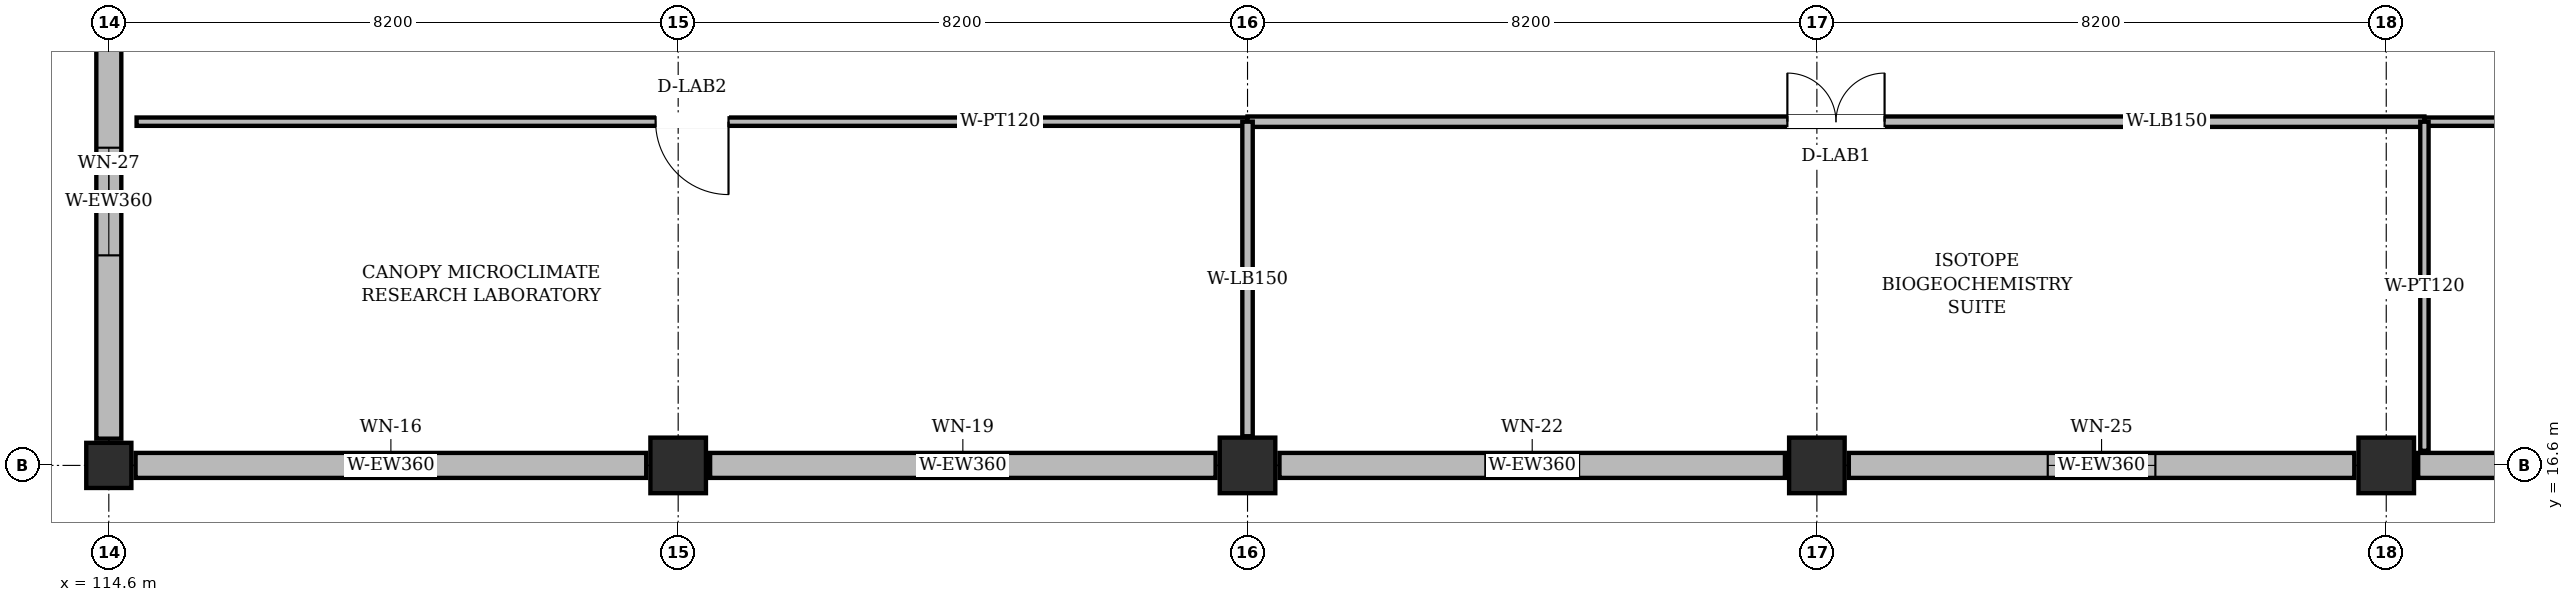
"""IFC4 building model, lengths in metres.
Left out: names, types, materials, properties, quantities, classifications, styles, units other than length and angle.
Written with IfcOpenShell. Run it as: python <this file> out.ifc"""

import sys

from ifc_helpers import new_model, si_unit, direction, frame, frame_2d, origin, origin_2d, place, context, subcontext, project, spatial, rectangle, extrude, element, fill, save


model = new_model("IFC4")
c1 = context("Model", 3, precision=1e-05, world=origin(), true_north=direction((0.0, 1.0)))
c2 = subcontext(c1, "Body", "Model", "MODEL_VIEW")
j1 = project(units=[si_unit("LENGTHUNIT", "METRE"), si_unit("PLANEANGLEUNIT", "RADIAN")], contexts=[c1])
p1 = place(None, origin())
s1 = spatial("IfcSite", under=j1, at=p1, CompositionType="ELEMENT")
p2 = place(p1, origin())
s2 = spatial("IfcBuilding", under=s1, at=p2, CompositionType="ELEMENT")
p3 = place(p2, frame((0.0, 0.0, 32.4)))
s3 = spatial("IfcBuildingStorey", under=s2, at=p3, CompositionType="ELEMENT", Elevation=32.4)
p4 = place(p3, frame((114.6, 16.6, 0.0), z_axis=(0.0, 0.0, 1.0), x_axis=(1.0, 0.0, 0.0)))
e1 = element("IfcColumn", 1, at=p4, inside=s3, PredefinedType="COLUMN", context=c2, shape_type="SweptSolid", body=[
    extrude(rectangle(XDim=0.65, YDim=0.65, at=origin_2d()), origin(), (0.0, 0.0, 1.0), 3.985),
])
p5 = place(p3, frame((122.8, 16.6, 0.0), z_axis=(0.0, 0.0, 1.0), x_axis=(1.0, 0.0, 0.0)))
e2 = element("IfcColumn", 2, at=p5, inside=s3, PredefinedType="COLUMN", context=c2, shape_type="SweptSolid", body=[
    extrude(rectangle(XDim=0.8, YDim=0.8, at=origin_2d()), origin(), (0.0, 0.0, 1.0), 3.985),
])
for number, where, z_axis, x_axis in (
    (3, (131.0, 16.6, 0.0), (0.0, 0.0, 1.0), (1.0, 0.0, 0.0)),
    (4, (139.2, 16.6, 0.0), (0.0, 0.0, 1.0), (1.0, 0.0, 0.0)),
    (5, (147.4, 16.6, 0.0), (0.0, 0.0, 1.0), (1.0, 0.0, 0.0)),
):
    element("IfcColumn", number, at=place(p3, frame(where, z_axis=z_axis, x_axis=x_axis)), inside=s3, PredefinedType="COLUMN", context=c2, shape_type="SweptSolid", body=[
        extrude(rectangle(XDim=0.8, YDim=0.8, at=origin_2d()), origin(), (0.0, 0.0, 1.0), 3.89),
    ])
p6 = place(p3, frame((114.985, 16.6, 0.0), z_axis=(0.0, 0.0, 1.0), x_axis=(1.0, 0.0, 0.0)))
e6 = element("IfcWall", 6, at=p6, inside=s3, PredefinedType="SOLIDWALL", context=c2, shape_type="SweptSolid", body=[
    extrude(rectangle(XDim=7.355, YDim=0.36, at=frame_2d((3.677, 0.0))), origin(), (0.0, 0.0, 1.0), 3.37),
])
p7 = place(p6, frame((3.202, 0.0, 0.95)))
e7 = element("IfcOpeningElement", 7, at=p7, cuts=e6, PredefinedType="OPENING", context=c2, shape_type="SweptSolid", body=[
    extrude(rectangle(XDim=0.95, YDim=2.05, at=frame_2d((0.475, 1.025))), frame((0.0, 0.192, 0.0), z_axis=(0.0, -1.0, 0.0), x_axis=(1.0, 0.0, 0.0)), (0.0, 0.0, 1.0), 0.384),
])
p8 = place(p3, frame((123.26, 16.6, 0.0), z_axis=(0.0, 0.0, 1.0), x_axis=(1.0, 0.0, 0.0)))
e8 = element("IfcWall", 8, at=p8, inside=s3, PredefinedType="SOLIDWALL", context=c2, shape_type="SweptSolid", body=[
    extrude(rectangle(XDim=7.28, YDim=0.36, at=frame_2d((3.64, 0.0))), origin(), (0.0, 0.0, 1.0), 3.275),
])
p9 = place(p8, frame((3.065, 0.0, 0.95)))
e9 = element("IfcOpeningElement", 9, at=p9, cuts=e8, PredefinedType="OPENING", context=c2, shape_type="SweptSolid", body=[
    extrude(rectangle(XDim=1.15, YDim=1.75, at=frame_2d((0.575, 0.875))), frame((0.0, 0.192, 0.0), z_axis=(0.0, -1.0, 0.0), x_axis=(1.0, 0.0, 0.0)), (0.0, 0.0, 1.0), 0.384),
])
p10 = place(p3, frame((131.46, 16.6, 0.0), z_axis=(0.0, 0.0, 1.0), x_axis=(1.0, 0.0, 0.0)))
e10 = element("IfcWall", 10, at=p10, inside=s3, PredefinedType="SOLIDWALL", context=c2, shape_type="SweptSolid", body=[
    extrude(rectangle(XDim=7.28, YDim=0.36, at=frame_2d((3.64, 0.0))), origin(), (0.0, 0.0, 1.0), 3.275),
])
p11 = place(p10, frame((2.965, 0.0, 0.95)))
e11 = element("IfcOpeningElement", 11, at=p11, cuts=e10, PredefinedType="OPENING", context=c2, shape_type="SweptSolid", body=[
    extrude(rectangle(XDim=1.35, YDim=1.5, at=frame_2d((0.675, 0.75))), frame((0.0, 0.192, 0.0), z_axis=(0.0, -1.0, 0.0), x_axis=(1.0, 0.0, 0.0)), (0.0, 0.0, 1.0), 0.384),
])
p12 = place(p3, frame((139.66, 16.6, 0.0), z_axis=(0.0, 0.0, 1.0), x_axis=(1.0, 0.0, 0.0)))
e12 = element("IfcWall", 12, at=p12, inside=s3, PredefinedType="SOLIDWALL", context=c2, shape_type="SweptSolid", body=[
    extrude(rectangle(XDim=7.28, YDim=0.36, at=frame_2d((3.64, 0.0))), origin(), (0.0, 0.0, 1.0), 3.275),
])
p13 = place(p12, frame((2.865, 0.0, 0.95)))
e13 = element("IfcOpeningElement", 13, at=p13, cuts=e12, PredefinedType="OPENING", context=c2, shape_type="SweptSolid", body=[
    extrude(rectangle(XDim=1.55, YDim=1.25, at=frame_2d((0.775, 0.625))), frame((0.0, 0.192, 0.0), z_axis=(0.0, -1.0, 0.0), x_axis=(1.0, 0.0, 0.0)), (0.0, 0.0, 1.0), 0.384),
])
p14 = place(p3, frame((147.86, 16.6, 0.0), z_axis=(0.0, 0.0, 1.0), x_axis=(1.0, 0.0, 0.0)))
e14 = element("IfcWall", 14, at=p14, inside=s3, PredefinedType="SOLIDWALL", context=c2, shape_type="SweptSolid", body=[
    extrude(rectangle(XDim=7.28, YDim=0.36, at=frame_2d((3.64, 0.0))), origin(), (0.0, 0.0, 1.0), 3.275),
])
p15 = place(p14, frame((2.865, 0.0, 0.95)))
e15 = element("IfcOpeningElement", 15, at=p15, cuts=e14, PredefinedType="OPENING", context=c2, shape_type="SweptSolid", body=[
    extrude(rectangle(XDim=1.55, YDim=2.05, at=frame_2d((0.775, 1.025))), frame((0.0, 0.192, 0.0), z_axis=(0.0, -1.0, 0.0), x_axis=(1.0, 0.0, 0.0)), (0.0, 0.0, 1.0), 0.384),
])
p16 = place(p3, frame((114.6, 23.815, 0.0), z_axis=(0.0, 0.0, 1.0), x_axis=(0.0, -1.0, 0.0)))
e16 = element("IfcWall", 16, at=p16, inside=s3, PredefinedType="SOLIDWALL", context=c2, shape_type="SweptSolid", body=[
    extrude(rectangle(XDim=6.83, YDim=0.36, at=frame_2d((3.415, 0.0))), origin(), (0.0, 0.0, 1.0), 3.37),
])
p17 = place(p16, frame((2.64, 0.0, 0.95)))
e17 = element("IfcOpeningElement", 17, at=p17, cuts=e16, PredefinedType="OPENING", context=c2, shape_type="SweptSolid", body=[
    extrude(rectangle(XDim=1.55, YDim=1.75, at=frame_2d((0.775, 0.875))), frame((0.0, 0.192, 0.0), z_axis=(0.0, -1.0, 0.0), x_axis=(1.0, 0.0, 0.0)), (0.0, 0.0, 1.0), 0.384),
])
p18 = place(p3, frame((131.0, 21.55, 0.0), z_axis=(0.0, 0.0, 1.0), x_axis=(-1.0, 0.0, 0.0)))
e18 = element("IfcWall", 18, at=p18, inside=s3, PredefinedType="PARTITIONING", context=c2, shape_type="SweptSolid", body=[
    extrude(rectangle(XDim=16.0, YDim=0.12, at=frame_2d((8.0, 0.0))), origin(), (0.0, 0.0, 1.0), 3.565),
])
p19 = place(p18, frame((7.475, 0.0, 0.0)))
e19 = element("IfcOpeningElement", 19, at=p19, cuts=e18, PredefinedType="OPENING", context=c2, shape_type="SweptSolid", body=[
    extrude(rectangle(XDim=1.05, YDim=2.2, at=frame_2d((0.525, 1.1))), frame((0.0, 0.072, 0.0), z_axis=(0.0, -1.0, 0.0), x_axis=(1.0, 0.0, 0.0)), (0.0, 0.0, 1.0), 0.144),
])
p20 = place(p3, frame((147.95, 21.55, 0.0), z_axis=(0.0, 0.0, 1.0), x_axis=(-1.0, 0.0, 0.0)))
e20 = element("IfcWall", 20, at=p20, inside=s3, PredefinedType="PARTITIONING", context=c2, shape_type="SweptSolid", body=[
    extrude(rectangle(XDim=16.95, YDim=0.15, at=frame_2d((8.475, 0.0))), origin(), (0.0, 0.0, 1.0), 3.465),
])
p21 = place(p20, frame((7.775, 0.0, 0.0)))
e21 = element("IfcOpeningElement", 21, at=p21, cuts=e20, PredefinedType="OPENING", context=c2, shape_type="SweptSolid", body=[
    extrude(rectangle(XDim=1.4, YDim=2.2, at=frame_2d((0.7, 1.1))), frame((0.0, 0.087, 0.0), z_axis=(0.0, -1.0, 0.0), x_axis=(1.0, 0.0, 0.0)), (0.0, 0.0, 1.0), 0.174),
])
p22 = place(p3, frame((149.7, 21.55, 0.0), z_axis=(0.0, 0.0, 1.0), x_axis=(-1.0, 0.0, 0.0)))
e22 = element("IfcWall", 22, at=p22, inside=s3, PredefinedType="PARTITIONING", context=c2, shape_type="SweptSolid", body=[
    extrude(rectangle(XDim=1.75, YDim=0.12, at=frame_2d((0.875, 0.0))), origin(), (0.0, 0.0, 1.0), 3.465),
])
p23 = place(p3, frame((131.0, 21.55, 0.0), z_axis=(0.0, 0.0, 1.0), x_axis=(0.0, -1.0, 0.0)))
e23 = element("IfcWall", 23, at=p23, inside=s3, PredefinedType="PARTITIONING", context=c2, shape_type="SweptSolid", body=[
    extrude(rectangle(XDim=4.53, YDim=0.15, at=frame_2d((2.265, 0.0))), origin(), (0.0, 0.0, 1.0), 3.225),
])
p24 = place(p3, frame((147.95, 21.55, 0.0), z_axis=(0.0, 0.0, 1.0), x_axis=(0.0, -1.0, 0.0)))
e24 = element("IfcWall", 24, at=p24, inside=s3, PredefinedType="PARTITIONING", context=c2, shape_type="SweptSolid", body=[
    extrude(rectangle(XDim=4.74, YDim=0.12, at=frame_2d((2.37, 0.0))), origin(), (0.0, 0.0, 1.0), 3.805),
])
p25 = place(p7, origin())
e25 = element("IfcWindow", 25, at=p25, inside=s3, PartitioningType="SINGLE_PANEL", PredefinedType="WINDOW", context=c2, shape_type="SweptSolid", body=[
    extrude(rectangle(XDim=0.95, YDim=2.05, at=frame_2d((0.475, 1.025))), frame((0.0, 0.03, 0.0), z_axis=(0.0, -1.0, 0.0), x_axis=(1.0, 0.0, 0.0)), (0.0, 0.0, 1.0), 0.06),
])
fill(e7, e25)
p26 = place(p9, origin())
e26 = element("IfcWindow", 26, at=p26, inside=s3, PartitioningType="SINGLE_PANEL", PredefinedType="WINDOW", context=c2, shape_type="SweptSolid", body=[
    extrude(rectangle(XDim=1.15, YDim=1.75, at=frame_2d((0.575, 0.875))), frame((0.0, 0.03, 0.0), z_axis=(0.0, -1.0, 0.0), x_axis=(1.0, 0.0, 0.0)), (0.0, 0.0, 1.0), 0.06),
])
fill(e9, e26)
p27 = place(p11, origin())
e27 = element("IfcWindow", 27, at=p27, inside=s3, PartitioningType="SINGLE_PANEL", PredefinedType="WINDOW", context=c2, shape_type="SweptSolid", body=[
    extrude(rectangle(XDim=1.35, YDim=1.5, at=frame_2d((0.675, 0.75))), frame((0.0, 0.03, 0.0), z_axis=(0.0, -1.0, 0.0), x_axis=(1.0, 0.0, 0.0)), (0.0, 0.0, 1.0), 0.06),
])
fill(e11, e27)
p28 = place(p13, origin())
e28 = element("IfcWindow", 28, at=p28, inside=s3, PartitioningType="DOUBLE_PANEL_VERTICAL", PredefinedType="WINDOW", context=c2, shape_type="SweptSolid", body=[
    extrude(rectangle(XDim=1.55, YDim=1.25, at=frame_2d((0.775, 0.625))), frame((0.0, 0.03, 0.0), z_axis=(0.0, -1.0, 0.0), x_axis=(1.0, 0.0, 0.0)), (0.0, 0.0, 1.0), 0.06),
])
fill(e13, e28)
p29 = place(p17, origin())
e29 = element("IfcWindow", 29, at=p29, inside=s3, PartitioningType="DOUBLE_PANEL_VERTICAL", PredefinedType="WINDOW", context=c2, shape_type="SweptSolid", body=[
    extrude(rectangle(XDim=1.55, YDim=1.75, at=frame_2d((0.775, 0.875))), frame((0.0, 0.03, 0.0), z_axis=(0.0, -1.0, 0.0), x_axis=(1.0, 0.0, 0.0)), (0.0, 0.0, 1.0), 0.06),
])
fill(e17, e29)
p30 = place(p19, origin())
e30 = element("IfcDoor", 30, at=p30, inside=s3, OperationType="SINGLE_SWING_LEFT", PredefinedType="DOOR", context=c2, shape_type="SweptSolid", body=[
    extrude(rectangle(XDim=1.05, YDim=2.2, at=frame_2d((0.525, 1.1))), frame((0.0, 0.025, 0.0), z_axis=(0.0, -1.0, 0.0), x_axis=(1.0, 0.0, 0.0)), (0.0, 0.0, 1.0), 0.05),
])
fill(e19, e30)
p31 = place(p21, frame((1.4, 0.0, 0.0), z_axis=(0.0, 0.0, 1.0), x_axis=(-1.0, 0.0, 0.0)))
e31 = element("IfcDoor", 31, at=p31, inside=s3, OperationType="DOUBLE_DOOR_SINGLE_SWING", PredefinedType="DOOR", context=c2, shape_type="SweptSolid", body=[
    extrude(rectangle(XDim=1.4, YDim=2.2, at=frame_2d((0.7, 1.1))), frame((0.0, 0.025, 0.0), z_axis=(0.0, -1.0, 0.0), x_axis=(1.0, 0.0, 0.0)), (0.0, 0.0, 1.0), 0.05),
])
fill(e21, e31)
save(model, sys.argv[1])
